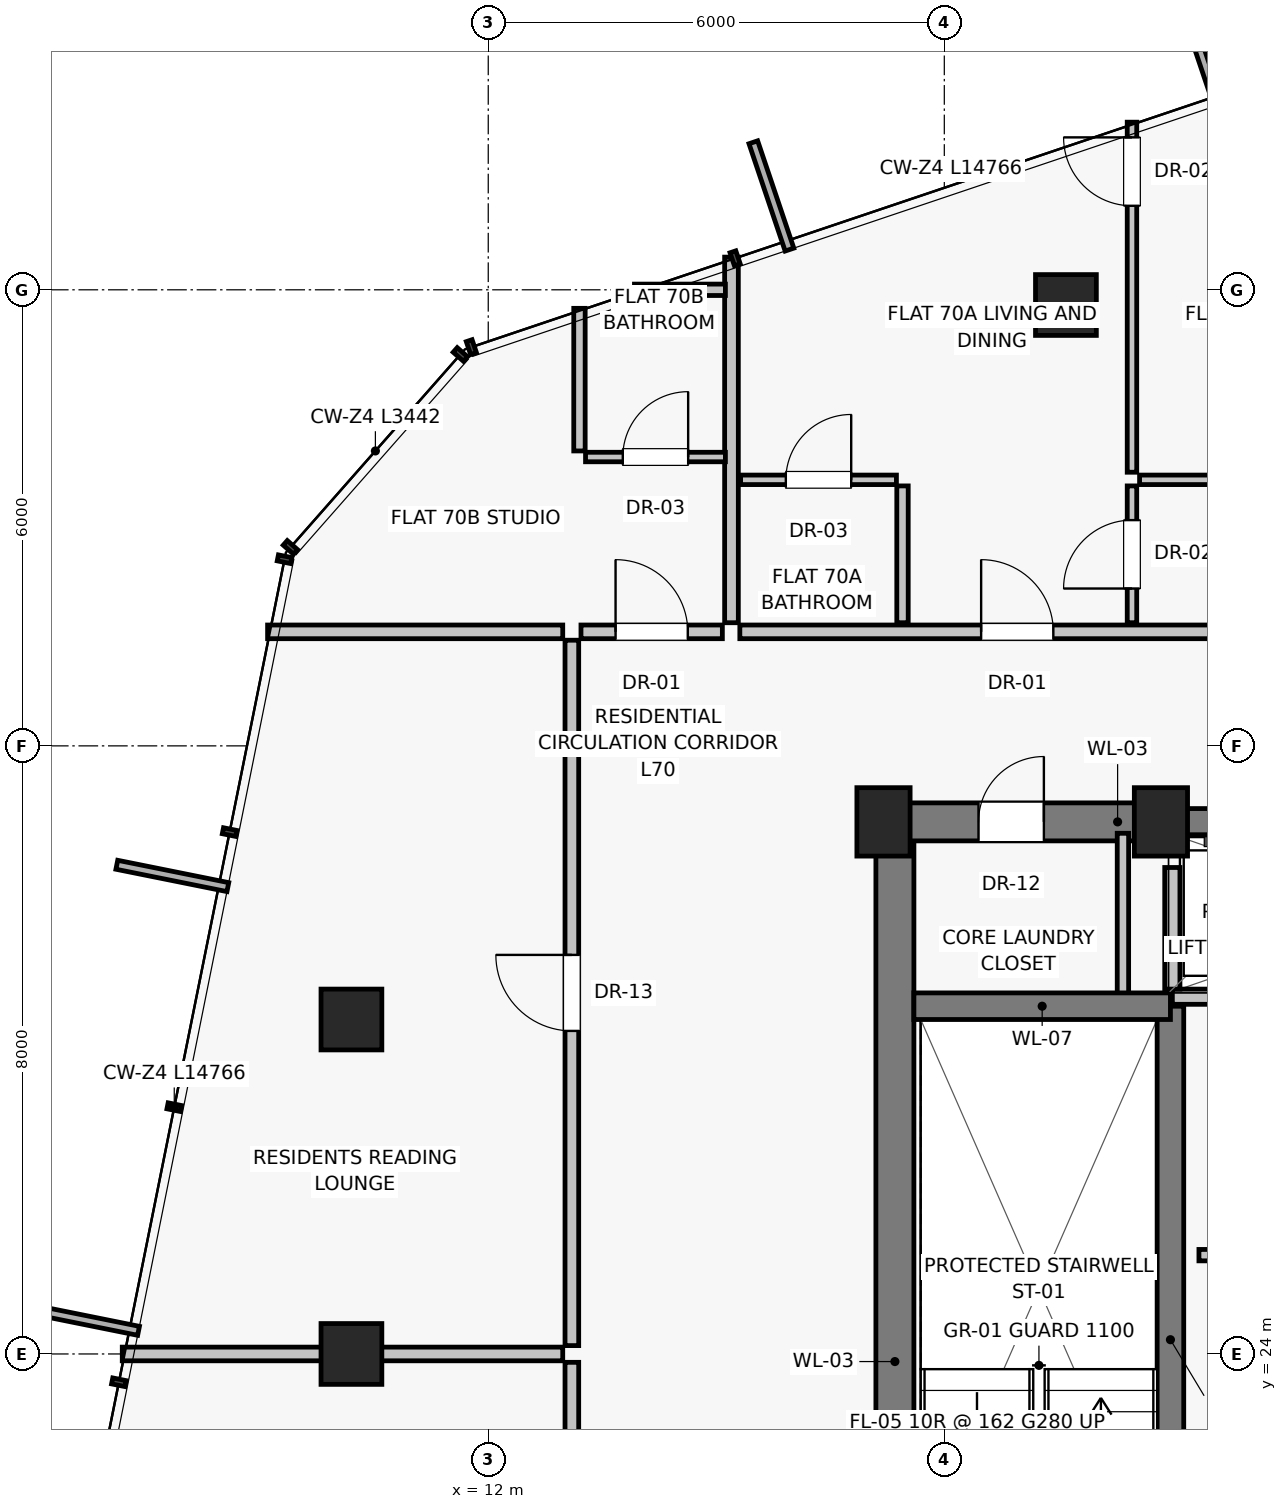
"""IFC4 building model, lengths in metres.
Left out: names, types, materials, properties, quantities, classifications, styles, units other than length and angle.
Written with IfcOpenShell. Run it as: python <this file> out.ifc"""

import sys

from ifc_helpers import new_model, si_unit, direction, frame, frame_2d, origin, origin_2d, place, context, subcontext, project, spatial, rectangle, extrude, source, transform, mapped, element, fill, save


model = new_model("IFC4")
c1 = context("Model", 3, precision=1e-05, world=origin(), true_north=direction((0.0, 1.0)))
c2 = subcontext(c1, "Body", "Model", "MODEL_VIEW")
j1 = project(units=[si_unit("LENGTHUNIT", "METRE"), si_unit("PLANEANGLEUNIT", "RADIAN")], contexts=[c1])
p1 = place(None, origin())
s1 = spatial("IfcSite", under=j1, at=p1, CompositionType="ELEMENT")
p2 = place(p1, origin())
s2 = spatial("IfcBuilding", under=s1, at=p2, CompositionType="ELEMENT")
p3 = place(p2, frame((0.0, 0.0, 248.0)))
s3 = spatial("IfcBuildingStorey", under=s2, at=p3, CompositionType="ELEMENT", Elevation=248.0)
for number, where, z_axis, x_axis in (
    (1, (17.2, 31.0, 0.0), (0.0, 0.0, 1.0), (1.0, 0.0, 0.0)),
    (2, (20.85, 31.0, 0.0), (0.0, 0.0, 1.0), (1.0, 0.0, 0.0)),
):
    element("IfcColumn", number, at=place(p3, frame(where, z_axis=z_axis, x_axis=x_axis)), inside=s3, PredefinedType="PILASTER", context=c2, shape_type="SweptSolid", body=[
        extrude(rectangle(XDim=0.7, YDim=0.9, at=origin_2d()), origin(), (0.0, 0.0, 1.0), 3.25),
    ])
for number, where, z_axis, x_axis in (
    (3, (19.6, 37.8, 0.0), (0.0, 0.0, 1.0), (1.0, 0.0, 0.0)),
    (4, (10.2, 28.4, 0.0), (0.0, 0.0, 1.0), (1.0, 0.0, 0.0)),
    (5, (10.2, 24.0, 0.0), (0.0, 0.0, 1.0), (1.0, 0.0, 0.0)),
):
    element("IfcColumn", number, at=place(p3, frame(where, z_axis=z_axis, x_axis=x_axis)), inside=s3, PredefinedType="COLUMN", context=c2, shape_type="SweptSolid", body=[
        extrude(rectangle(XDim=0.8, YDim=0.8, at=origin_2d()), origin(), (0.0, 0.0, 1.0), 3.25),
    ])
p4 = place(p3, frame((17.35, 16.8, 0.0), z_axis=(0.0, 0.0, 1.0), x_axis=(0.0, 1.0, 0.0)))
e6 = element("IfcWall", 6, at=p4, inside=s3, PredefinedType="SHEAR", context=c2, shape_type="SweptSolid", body=[
    extrude(rectangle(XDim=14.2, YDim=0.5, at=frame_2d((7.1, 0.0))), origin(), (0.0, 0.0, 1.0), 3.015),
])
p5 = place(p3, frame((17.2, 31.0, 0.0), z_axis=(0.0, 0.0, 1.0), x_axis=(1.0, 0.0, 0.0)))
e7 = element("IfcWall", 7, at=p5, inside=s3, PredefinedType="SHEAR", context=c2, shape_type="SweptSolid", body=[
    extrude(rectangle(XDim=3.8, YDim=0.5, at=frame_2d((1.9, 0.0))), origin(), (0.0, 0.0, 1.0), 3.015),
])
p6 = place(p5, frame((1.25, 0.0, 0.0)))
e8 = element("IfcOpeningElement", 8, at=p6, cuts=e7, PredefinedType="OPENING", context=c2, shape_type="SweptSolid", body=[
    extrude(rectangle(XDim=0.86, YDim=2.01, at=frame_2d((0.43, 1.005))), frame((0.0, 0.26, 0.0), z_axis=(0.0, -1.0, 0.0), x_axis=(1.0, 0.0, 0.0)), (0.0, 0.0, 1.0), 0.52),
])
p7 = place(p3, frame((21.0, 31.0, 0.0), z_axis=(0.0, 0.0, 1.0), x_axis=(1.0, 0.0, 0.0)))
e9 = element("IfcWall", 9, at=p7, inside=s3, PredefinedType="SHEAR", context=c2, shape_type="SweptSolid", body=[
    extrude(rectangle(XDim=6.0, YDim=0.35, at=frame_2d((3.0, 0.0))), origin(), (0.0, 0.0, 1.0), 3.015),
])
p8 = place(p7, frame((0.5, 0.0, 0.0)))
e10 = element("IfcOpeningElement", 10, at=p8, cuts=e9, PredefinedType="OPENING", context=c2, shape_type="SweptSolid", body=[
    extrude(rectangle(XDim=1.1, YDim=2.08, at=frame_2d((0.55, 1.04))), frame((0.0, 0.185, 0.0), z_axis=(0.0, -1.0, 0.0), x_axis=(1.0, 0.0, 0.0)), (0.0, 0.0, 1.0), 0.37),
])
p9 = place(p7, frame((2.45, 0.0, 0.0)))
e11 = element("IfcOpeningElement", 11, at=p9, cuts=e9, PredefinedType="OPENING", context=c2, shape_type="SweptSolid", body=[
    extrude(rectangle(XDim=1.1, YDim=2.08, at=frame_2d((0.55, 1.04))), frame((0.0, 0.185, 0.0), z_axis=(0.0, -1.0, 0.0), x_axis=(1.0, 0.0, 0.0)), (0.0, 0.0, 1.0), 0.37),
])
p10 = place(p7, frame((4.4, 0.0, 0.0)))
e12 = element("IfcOpeningElement", 12, at=p10, cuts=e9, PredefinedType="OPENING", context=c2, shape_type="SweptSolid", body=[
    extrude(rectangle(XDim=1.1, YDim=2.08, at=frame_2d((0.55, 1.04))), frame((0.0, 0.185, 0.0), z_axis=(0.0, -1.0, 0.0), x_axis=(1.0, 0.0, 0.0)), (0.0, 0.0, 1.0), 0.37),
])
p11 = place(p3, frame((20.35, 28.65, 0.0), z_axis=(0.0, 0.0, 1.0), x_axis=(0.0, 1.0, 0.0)))
e13 = element("IfcWall", 13, at=p11, inside=s3, PredefinedType="PARTITIONING", context=c2, shape_type="SweptSolid", body=[
    extrude(rectangle(XDim=2.2, YDim=0.15, at=frame_2d((1.1, 0.0))), origin(), (0.0, 0.0, 1.0), 3.015),
])
p12 = place(p3, frame((20.975, 19.8, 0.0), z_axis=(0.0, 0.0, 1.0), x_axis=(0.0, 1.0, 0.0)))
e14 = element("IfcWall", 14, at=p12, inside=s3, PredefinedType="SHEAR", context=c2, shape_type="SweptSolid", body=[
    extrude(rectangle(XDim=8.775, YDim=0.35, at=frame_2d((4.387, 0.0))), origin(), (0.0, 0.0, 1.0), 3.015),
])
p13 = place(p3, frame((17.6, 28.575, 0.0), z_axis=(0.0, 0.0, 1.0), x_axis=(1.0, 0.0, 0.0)))
e15 = element("IfcWall", 15, at=p13, inside=s3, PredefinedType="SHEAR", context=c2, shape_type="SweptSolid", body=[
    extrude(rectangle(XDim=3.375, YDim=0.35, at=frame_2d((1.688, 0.0))), origin(), (0.0, 0.0, 1.0), 3.015),
])
p14 = place(p3, frame((21.0, 28.7, 0.0), z_axis=(0.0, 0.0, 1.0), x_axis=(1.0, 0.0, 0.0)))
e16 = element("IfcWall", 16, at=p14, inside=s3, PredefinedType="SOLIDWALL", context=c2, shape_type="SweptSolid", body=[
    extrude(rectangle(XDim=6.0, YDim=0.2, at=frame_2d((3.0, 0.0))), origin(), (0.0, 0.0, 1.0), 3.015),
])
p15 = place(p3, frame((21.0, 28.8, 0.0), z_axis=(0.0, 0.0, 1.0), x_axis=(0.0, 1.0, 0.0)))
e17 = element("IfcWall", 17, at=p15, inside=s3, PredefinedType="SOLIDWALL", context=c2, shape_type="SweptSolid", body=[
    extrude(rectangle(XDim=1.6, YDim=0.2, at=frame_2d((0.8, 0.0))), origin(), (0.0, 0.0, 1.0), 3.015),
])
p16 = place(p3, frame((21.35, 25.3, 0.0), z_axis=(0.0, 0.0, 1.0), x_axis=(1.0, 0.0, 0.0)))
e18 = element("IfcWall", 18, at=p16, inside=s3, PredefinedType="PARTITIONING", context=c2, shape_type="SweptSolid", body=[
    extrude(rectangle(XDim=2.55, YDim=0.15, at=frame_2d((1.275, 0.0))), origin(), (0.0, 0.0, 1.0), 3.015),
])
p17 = place(p16, frame((0.8, 0.0, 0.0)))
e19 = element("IfcOpeningElement", 19, at=p17, cuts=e18, PredefinedType="OPENING", context=c2, shape_type="SweptSolid", body=[
    extrude(rectangle(XDim=0.86, YDim=2.01, at=frame_2d((0.43, 1.005))), frame((0.0, 0.085, 0.0), z_axis=(0.0, -1.0, 0.0), x_axis=(1.0, 0.0, 0.0)), (0.0, 0.0, 1.0), 0.17),
])
p18 = place(p3, frame((15.2, 33.62, 0.0), z_axis=(0.0, 0.0, 1.0), x_axis=(0.0, 1.0, 0.0)))
e20 = element("IfcWall", 20, at=p18, inside=s3, PredefinedType="PARTITIONING", context=c2, shape_type="SweptSolid", body=[
    extrude(rectangle(XDim=4.81, YDim=0.18, at=frame_2d((2.405, 0.0))), origin(), (0.0, 0.0, 1.0), 3.015),
])
p19 = place(p3, frame((15.31, 33.5, 0.0), z_axis=(0.0, 0.0, 1.0), x_axis=(1.0, 0.0, 0.0)))
e21 = element("IfcWall", 21, at=p19, inside=s3, PredefinedType="PARTITIONING", context=c2, shape_type="SweptSolid", body=[
    extrude(rectangle(XDim=9.36, YDim=0.18, at=frame_2d((4.68, 0.0))), origin(), (0.0, 0.0, 1.0), 3.015),
])
p20 = place(p19, frame((3.175, 0.0, 0.0)))
e22 = element("IfcOpeningElement", 22, at=p20, cuts=e21, PredefinedType="OPENING", context=c2, shape_type="SweptSolid", body=[
    extrude(rectangle(XDim=0.95, YDim=2.02, at=frame_2d((0.475, 1.01))), frame((0.0, 0.1, 0.0), z_axis=(0.0, -1.0, 0.0), x_axis=(1.0, 0.0, 0.0)), (0.0, 0.0, 1.0), 0.2),
])
p21 = place(p3, frame((17.45, 33.62, 0.0), z_axis=(0.0, 0.0, 1.0), x_axis=(0.0, 1.0, 0.0)))
e23 = element("IfcWall", 23, at=p21, inside=s3, PredefinedType="PARTITIONING", context=c2, shape_type="SweptSolid", body=[
    extrude(rectangle(XDim=1.8, YDim=0.15, at=frame_2d((0.9, 0.0))), origin(), (0.0, 0.0, 1.0), 3.015),
])
p22 = place(p3, frame((15.32, 35.5, 0.0), z_axis=(0.0, 0.0, 1.0), x_axis=(1.0, 0.0, 0.0)))
e24 = element("IfcWall", 24, at=p22, inside=s3, PredefinedType="PARTITIONING", context=c2, shape_type="SweptSolid", body=[
    extrude(rectangle(XDim=2.05, YDim=0.125, at=frame_2d((1.025, 0.0))), origin(), (0.0, 0.0, 1.0), 3.015),
])
p23 = place(p22, frame((0.595, 0.0, 0.0)))
e25 = element("IfcOpeningElement", 25, at=p23, cuts=e24, PredefinedType="OPENING", context=c2, shape_type="SweptSolid", body=[
    extrude(rectangle(XDim=0.86, YDim=2.01, at=frame_2d((0.43, 1.005))), frame((0.0, 0.073, 0.0), z_axis=(0.0, -1.0, 0.0), x_axis=(1.0, 0.0, 0.0)), (0.0, 0.0, 1.0), 0.145),
])
p24 = place(p3, frame((20.469, 33.62, 0.0), z_axis=(0.0, 0.0, 1.0), x_axis=(0.0, 1.0, 0.0)))
e26 = element("IfcWall", 26, at=p24, inside=s3, PredefinedType="PARTITIONING", context=c2, shape_type="SweptSolid", body=[
    extrude(rectangle(XDim=1.8, YDim=0.125, at=frame_2d((0.9, 0.0))), origin(), (0.0, 0.0, 1.0), 2.543),
])
p25 = place(p24, frame((0.45, 0.0, 0.0)))
e27 = element("IfcOpeningElement", 27, at=p25, cuts=e26, PredefinedType="OPENING", context=c2, shape_type="SweptSolid", body=[
    extrude(rectangle(XDim=0.9, YDim=2.01, at=frame_2d((0.45, 1.005))), frame((0.0, 0.073, 0.0), z_axis=(0.0, -1.0, 0.0), x_axis=(1.0, 0.0, 0.0)), (0.0, 0.0, 1.0), 0.145),
])
p26 = place(p3, frame((20.569, 35.5, 0.0), z_axis=(0.0, 0.0, 1.0), x_axis=(1.0, 0.0, 0.0)))
e28 = element("IfcWall", 28, at=p26, inside=s3, PredefinedType="PARTITIONING", context=c2, shape_type="SweptSolid", body=[
    extrude(rectangle(XDim=4.091, YDim=0.125, at=frame_2d((2.045, 0.0))), origin(), (0.0, 0.0, 1.0), 3.015),
])
p27 = place(p3, frame((20.469, 35.6, 0.0), z_axis=(0.0, 0.0, 1.0), x_axis=(0.0, 1.0, 0.0)))
e29 = element("IfcWall", 29, at=p27, inside=s3, PredefinedType="PARTITIONING", context=c2, shape_type="SweptSolid", body=[
    extrude(rectangle(XDim=4.605, YDim=0.125, at=frame_2d((2.303, 0.0))), origin(), (0.0, 0.0, 1.0), 2.543),
])
p28 = place(p27, frame((3.505, 0.0, 0.0)))
e30 = element("IfcOpeningElement", 30, at=p28, cuts=e29, PredefinedType="OPENING", context=c2, shape_type="SweptSolid", body=[
    extrude(rectangle(XDim=0.9, YDim=2.01, at=frame_2d((0.45, 1.005))), frame((0.0, 0.073, 0.0), z_axis=(0.0, -1.0, 0.0), x_axis=(1.0, 0.0, 0.0)), (0.0, 0.0, 1.0), 0.145),
])
p29 = place(p3, frame((12.98, 33.5, 0.0), z_axis=(0.0, 0.0, 1.0), x_axis=(-1.0, 0.0, 0.0)))
e31 = element("IfcWall", 31, at=p29, inside=s3, PredefinedType="PARTITIONING", context=c2, shape_type="SweptSolid", body=[
    extrude(rectangle(XDim=3.883, YDim=0.18, at=frame_2d((1.941, 0.0))), origin(), (0.0, 0.0, 1.0), 3.015),
])
p30 = place(p3, frame((13.1, 19.26, 0.0), z_axis=(0.0, 0.0, 1.0), x_axis=(0.0, 1.0, 0.0)))
e32 = element("IfcWall", 32, at=p30, inside=s3, PredefinedType="PARTITIONING", context=c2, shape_type="SweptSolid", body=[
    extrude(rectangle(XDim=4.63, YDim=0.18, at=frame_2d((2.315, 0.0))), origin(), (0.0, 0.0, 1.0), 2.662),
])
p31 = place(p30, frame((1.815, 0.0, 0.0)))
e33 = element("IfcOpeningElement", 33, at=p31, cuts=e32, PredefinedType="OPENING", context=c2, shape_type="SweptSolid", body=[
    extrude(rectangle(XDim=1.0, YDim=2.01, at=frame_2d((0.5, 1.005))), frame((0.0, 0.1, 0.0), z_axis=(0.0, -1.0, 0.0), x_axis=(1.0, 0.0, 0.0)), (0.0, 0.0, 1.0), 0.2),
])
p32 = place(p3, frame((13.1, 24.11, 0.0), z_axis=(0.0, 0.0, 1.0), x_axis=(0.0, 1.0, 0.0)))
e34 = element("IfcWall", 34, at=p32, inside=s3, PredefinedType="PARTITIONING", context=c2, shape_type="SweptSolid", body=[
    extrude(rectangle(XDim=9.28, YDim=0.18, at=frame_2d((4.64, 0.0))), origin(), (0.0, 0.0, 1.0), 2.662),
])
p33 = place(p32, frame((4.14, 0.0, 0.0)))
e35 = element("IfcOpeningElement", 35, at=p33, cuts=e34, PredefinedType="OPENING", context=c2, shape_type="SweptSolid", body=[
    extrude(rectangle(XDim=1.0, YDim=2.01, at=frame_2d((0.5, 1.005))), frame((0.0, 0.1, 0.0), z_axis=(0.0, -1.0, 0.0), x_axis=(1.0, 0.0, 0.0)), (0.0, 0.0, 1.0), 0.2),
])
p34 = place(p3, frame((12.98, 24.0, 0.0), z_axis=(0.0, 0.0, 1.0), x_axis=(-1.0, 0.0, 0.0)))
e36 = element("IfcWall", 36, at=p34, inside=s3, PredefinedType="PARTITIONING", context=c2, shape_type="SweptSolid", body=[
    extrude(rectangle(XDim=5.795, YDim=0.18, at=frame_2d((2.897, 0.0))), origin(), (0.0, 0.0, 1.0), 3.015),
])
p35 = place(p3, frame((13.22, 33.5, 0.0), z_axis=(0.0, 0.0, 1.0), x_axis=(1.0, 0.0, 0.0)))
e37 = element("IfcWall", 37, at=p35, inside=s3, PredefinedType="PARTITIONING", context=c2, shape_type="SweptSolid", body=[
    extrude(rectangle(XDim=1.86, YDim=0.18, at=frame_2d((0.93, 0.0))), origin(), (0.0, 0.0, 1.0), 3.015),
])
p36 = place(p35, frame((0.455, 0.0, 0.0)))
e38 = element("IfcOpeningElement", 38, at=p36, cuts=e37, PredefinedType="OPENING", context=c2, shape_type="SweptSolid", body=[
    extrude(rectangle(XDim=0.95, YDim=2.02, at=frame_2d((0.475, 1.01))), frame((0.0, 0.1, 0.0), z_axis=(0.0, -1.0, 0.0), x_axis=(1.0, 0.0, 0.0)), (0.0, 0.0, 1.0), 0.2),
])
p37 = place(p3, frame((13.28, 35.8, 0.0), z_axis=(0.0, 0.0, 1.0), x_axis=(1.0, 0.0, 0.0)))
e39 = element("IfcWall", 39, at=p37, inside=s3, PredefinedType="PARTITIONING", context=c2, shape_type="SweptSolid", body=[
    extrude(rectangle(XDim=1.84, YDim=0.125, at=frame_2d((0.92, 0.0))), origin(), (0.0, 0.0, 1.0), 3.015),
])
p38 = place(p37, frame((0.49, 0.0, 0.0)))
e40 = element("IfcOpeningElement", 40, at=p38, cuts=e39, PredefinedType="OPENING", context=c2, shape_type="SweptSolid", body=[
    extrude(rectangle(XDim=0.86, YDim=2.01, at=frame_2d((0.43, 1.005))), frame((0.0, 0.073, 0.0), z_axis=(0.0, -1.0, 0.0), x_axis=(1.0, 0.0, 0.0)), (0.0, 0.0, 1.0), 0.145),
])
p39 = place(p3, frame((13.924, 38.0, 0.0), z_axis=(0.0, 0.0, 1.0), x_axis=(1.0, 0.0, 0.0)))
e41 = element("IfcWall", 41, at=p39, inside=s3, PredefinedType="PARTITIONING", context=c2, shape_type="SweptSolid", body=[
    extrude(rectangle(XDim=1.197, YDim=0.15, at=frame_2d((0.598, 0.0))), origin(), (0.0, 0.0, 1.0), 3.015),
])
p40 = place(p3, frame((13.2, 35.88, 0.0), z_axis=(0.0, 0.0, 1.0), x_axis=(0.0, 1.0, 0.0)))
e42 = element("IfcWall", 42, at=p40, inside=s3, PredefinedType="PARTITIONING", context=c2, shape_type="SweptSolid", body=[
    extrude(rectangle(XDim=1.876, YDim=0.15, at=frame_2d((0.938, 0.0))), origin(), (0.0, 0.0, 1.0), 3.015),
])
m1 = source(origin(), c2, "Body", "SweptSolid", [
    extrude(rectangle(XDim=0.86, YDim=2.01, at=frame_2d((0.43, 1.005))), frame((0.0, 0.025, 0.0), z_axis=(0.0, -1.0, 0.0), x_axis=(1.0, 0.0, 0.0)), (0.0, 0.0, 1.0), 0.05),
])
p41 = place(p6, origin())
e43 = element("IfcDoor", 43, at=p41, inside=s3, OperationType="SINGLE_SWING_RIGHT", PredefinedType="DOOR", context=c2, shape_type="MappedRepresentation", body=[
    mapped(m1, transform((0.0, 0.0, 0.0), scale=1.0)),
])
fill(e8, e43)
m2 = source(origin(), c2, "Body", "SweptSolid", [
    extrude(rectangle(XDim=0.95, YDim=2.02, at=frame_2d((0.475, 1.01))), frame((0.0, 0.025, 0.0), z_axis=(0.0, -1.0, 0.0), x_axis=(1.0, 0.0, 0.0)), (0.0, 0.0, 1.0), 0.05),
])
p42 = place(p20, origin())
e44 = element("IfcDoor", 44, at=p42, inside=s3, OperationType="SINGLE_SWING_LEFT", PredefinedType="DOOR", context=c2, shape_type="MappedRepresentation", body=[
    mapped(m2, transform((0.0, 0.0, 0.0), scale=1.0)),
])
fill(e22, e44)
p43 = place(p23, origin())
e45 = element("IfcDoor", 45, at=p43, inside=s3, OperationType="SINGLE_SWING_RIGHT", PredefinedType="DOOR", context=c2, shape_type="MappedRepresentation", body=[
    mapped(m1, transform((0.0, 0.0, 0.0), scale=1.0)),
])
fill(e25, e45)
m3 = source(origin(), c2, "Body", "SweptSolid", [
    extrude(rectangle(XDim=0.9, YDim=2.01, at=frame_2d((0.45, 1.005))), frame((0.0, 0.025, 0.0), z_axis=(0.0, -1.0, 0.0), x_axis=(1.0, 0.0, 0.0)), (0.0, 0.0, 1.0), 0.05),
])
p44 = place(p25, origin())
e46 = element("IfcDoor", 46, at=p44, inside=s3, OperationType="SINGLE_SWING_LEFT", PredefinedType="DOOR", context=c2, shape_type="MappedRepresentation", body=[
    mapped(m3, transform((0.0, 0.0, 0.0), scale=1.0)),
])
fill(e27, e46)
p45 = place(p28, origin())
e47 = element("IfcDoor", 47, at=p45, inside=s3, OperationType="SINGLE_SWING_RIGHT", PredefinedType="DOOR", context=c2, shape_type="MappedRepresentation", body=[
    mapped(m3, transform((0.0, 0.0, 0.0), scale=1.0)),
])
fill(e30, e47)
m4 = source(origin(), c2, "Body", "SweptSolid", [
    extrude(rectangle(XDim=1.0, YDim=2.01, at=frame_2d((0.5, 1.005))), frame((0.0, 0.025, 0.0), z_axis=(0.0, -1.0, 0.0), x_axis=(1.0, 0.0, 0.0)), (0.0, 0.0, 1.0), 0.05),
])
p46 = place(p33, origin())
e48 = element("IfcDoor", 48, at=p46, inside=s3, OperationType="SINGLE_SWING_RIGHT", PredefinedType="DOOR", context=c2, shape_type="MappedRepresentation", body=[
    mapped(m4, transform((0.0, 0.0, 0.0), scale=1.0)),
])
fill(e35, e48)
p47 = place(p36, origin())
e49 = element("IfcDoor", 49, at=p47, inside=s3, OperationType="SINGLE_SWING_LEFT", PredefinedType="DOOR", context=c2, shape_type="MappedRepresentation", body=[
    mapped(m2, transform((0.0, 0.0, 0.0), scale=1.0)),
])
fill(e38, e49)
p48 = place(p38, origin())
e50 = element("IfcDoor", 50, at=p48, inside=s3, OperationType="SINGLE_SWING_RIGHT", PredefinedType="DOOR", context=c2, shape_type="MappedRepresentation", body=[
    mapped(m1, transform((0.0, 0.0, 0.0), scale=1.0)),
])
fill(e40, e50)
save(model, sys.argv[1])
